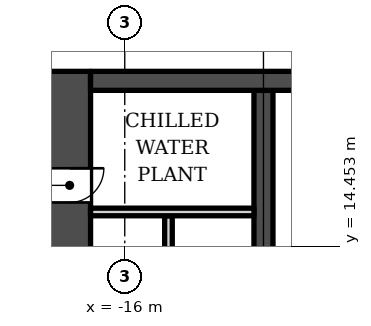
"""IFC4 building model, lengths in metres.
Left out: names, types, materials, properties, quantities, classifications, styles, units other than length and angle.
Written with IfcOpenShell. Run it as: python <this file> out.ifc"""

import sys

from ifc_helpers import new_model, si_unit, direction, frame, frame_2d, origin, place, context, subcontext, project, spatial, rectangle, extrude, element, fill, save


model = new_model("IFC4")
c1 = context("Model", 3, precision=1e-05, world=origin(), true_north=direction((0.0, 1.0)))
c2 = subcontext(c1, "Body", "Model", "MODEL_VIEW")
j1 = project(units=[si_unit("LENGTHUNIT", "METRE"), si_unit("PLANEANGLEUNIT", "RADIAN")], contexts=[c1])
p1 = place(None, origin())
s1 = spatial("IfcSite", under=j1, at=p1, CompositionType="ELEMENT")
p2 = place(p1, origin())
s2 = spatial("IfcBuilding", under=s1, at=p2, CompositionType="ELEMENT")
p3 = place(p2, frame((0.0, 0.0, -10.0)))
s3 = spatial("IfcBuildingStorey", under=s2, at=p3, CompositionType="ELEMENT", Elevation=-10.0)
p4 = place(p3, frame((-16.9, 18.802, -1.6), z_axis=(0.0, 0.0, 1.0), x_axis=(1.0, 0.0, 0.0)))
e1 = element("IfcWall", 1, at=p4, inside=s3, PredefinedType="SHEAR", context=c2, shape_type="SweptSolid", body=[
    extrude(rectangle(XDim=33.8, YDim=0.5, at=frame_2d((16.9, 0.0))), origin(), (0.0, 0.0, 1.0), 6.6),
])
p5 = place(p3, frame((-12.35, 5.253, -1.6), z_axis=(0.0, 0.0, 1.0), x_axis=(0.0, 1.0, 0.0)))
e2 = element("IfcWall", 2, at=p5, inside=s3, PredefinedType="SHEAR", context=c2, shape_type="SweptSolid", body=[
    extrude(rectangle(XDim=13.3, YDim=0.5, at=frame_2d((6.65, 0.0))), origin(), (0.0, 0.0, 1.0), 6.6),
])
p6 = place(p3, frame((-17.45, 5.853, -1.6), z_axis=(0.0, 0.0, 1.0), x_axis=(0.0, 1.0, 0.0)))
e3 = element("IfcWall", 3, at=p6, inside=s3, PredefinedType="SHEAR", context=c2, shape_type="SweptSolid", body=[
    extrude(rectangle(XDim=13.2, YDim=1.1, at=frame_2d((6.6, 0.0))), origin(), (0.0, 0.0, 1.0), 6.6),
])
p7 = place(p6, frame((4.1, 0.0, 1.6)))
e4 = element("IfcOpeningElement", 4, at=p7, cuts=e3, PredefinedType="OPENING", context=c2, shape_type="SweptSolid", body=[
    extrude(rectangle(XDim=1.6, YDim=2.1, at=frame_2d((0.8, 1.05))), frame((0.0, 0.56, 0.0), z_axis=(0.0, -1.0, 0.0), x_axis=(1.0, 0.0, 0.0)), (0.0, 0.0, 1.0), 1.12),
])
p8 = place(p6, frame((9.75, 0.0, 1.6)))
e5 = element("IfcOpeningElement", 5, at=p8, cuts=e3, PredefinedType="OPENING", context=c2, shape_type="SweptSolid", body=[
    extrude(rectangle(XDim=0.9, YDim=2.1, at=frame_2d((0.45, 1.05))), frame((0.0, 0.56, 0.0), z_axis=(0.0, -1.0, 0.0), x_axis=(1.0, 0.0, 0.0)), (0.0, 0.0, 1.0), 1.12),
])
p9 = place(p3, frame((-14.85, 12.653, 0.0), z_axis=(0.0, 0.0, 1.0), x_axis=(0.0, 1.0, 0.0)))
e6 = element("IfcWall", 6, at=p9, inside=s3, PredefinedType="SOLIDWALL", context=c2, shape_type="SweptSolid", body=[
    extrude(rectangle(XDim=2.6, YDim=0.2, at=frame_2d((1.3, 0.0))), origin(), (0.0, 0.0, 1.0), 4.5),
])
p10 = place(p3, frame((-16.9, 15.353, 0.0), z_axis=(0.0, 0.0, 1.0), x_axis=(1.0, 0.0, 0.0)))
e7 = element("IfcWall", 7, at=p10, inside=s3, PredefinedType="SOLIDWALL", context=c2, shape_type="SweptSolid", body=[
    extrude(rectangle(XDim=4.3, YDim=0.2, at=frame_2d((2.15, 0.0))), origin(), (0.0, 0.0, 1.0), 4.5),
])
p11 = place(p8, origin())
e8 = element("IfcDoor", 8, at=p11, inside=s3, OperationType="SINGLE_SWING_RIGHT", PredefinedType="DOOR", context=c2, shape_type="SweptSolid", body=[
    extrude(rectangle(XDim=0.9, YDim=2.1, at=frame_2d((0.45, 1.05))), frame((0.0, -0.225, 0.0), z_axis=(0.0, -1.0, 0.0), x_axis=(1.0, 0.0, 0.0)), (0.0, 0.0, 1.0), 0.05),
])
fill(e5, e8)
save(model, sys.argv[1])
